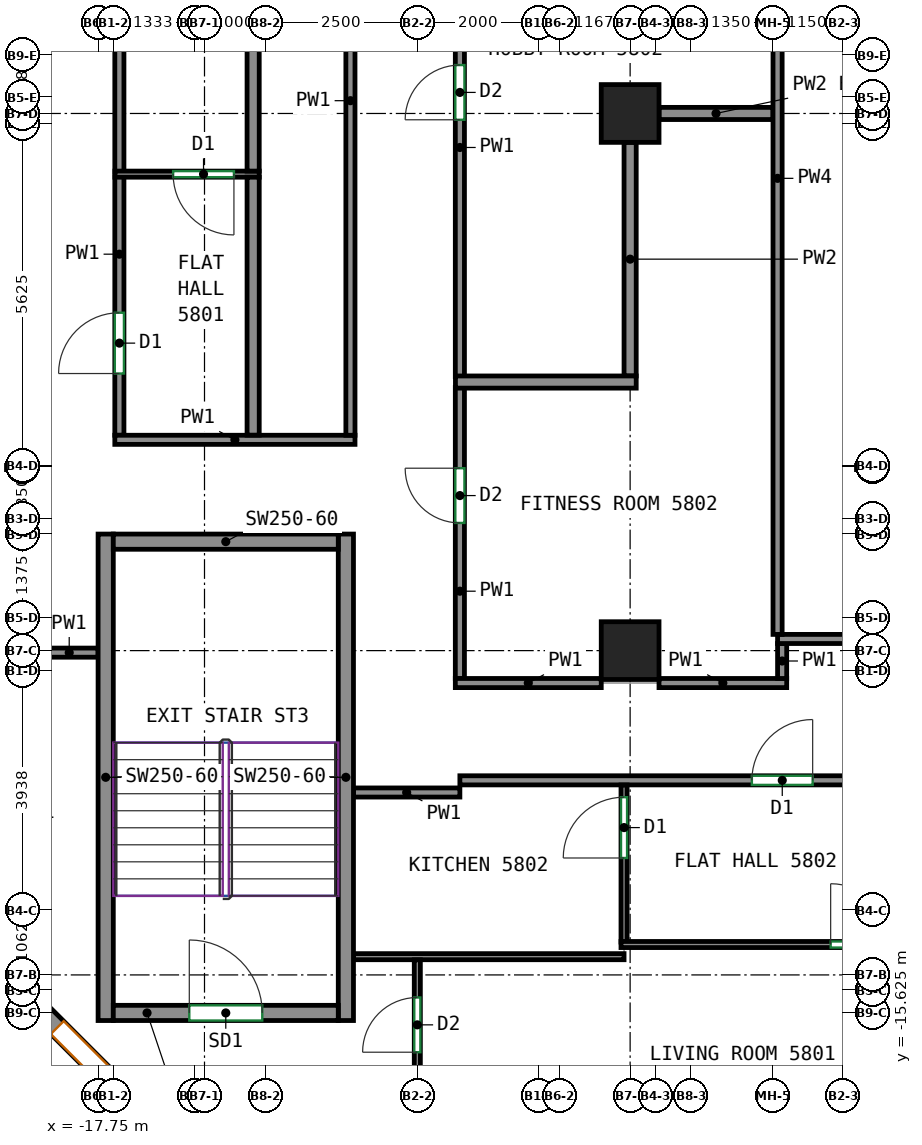
"""IFC4 building model, lengths in metres.
Left out: names, types, materials, properties, quantities, classifications, styles, units other than length and angle.
Written with IfcOpenShell. Run it as: python <this file> out.ifc"""

import sys

from ifc_helpers import new_model, si_unit, direction, frame, frame_2d, origin, origin_2d, place, context, subcontext, project, spatial, rectangle, extrude, source, transform, mapped, element, fill, save


model = new_model("IFC4")
c1 = context("Model", 3, precision=1e-05, world=origin(), true_north=direction((0.0, 1.0)))
c2 = subcontext(c1, "Body", "Model", "MODEL_VIEW")
j1 = project(units=[si_unit("LENGTHUNIT", "METRE"), si_unit("PLANEANGLEUNIT", "RADIAN")], contexts=[c1])
p1 = place(None, origin())
s1 = spatial("IfcSite", under=j1, at=p1, CompositionType="ELEMENT")
p2 = place(p1, origin())
s2 = spatial("IfcBuilding", under=s1, at=p2, CompositionType="ELEMENT")
p3 = place(p2, frame((0.0, 0.0, 242.4)))
s3 = spatial("IfcBuildingStorey", under=s2, at=p3, CompositionType="ELEMENT", Elevation=242.4)
m1 = source(origin(), c2, "Body", "SweptSolid", [
    extrude(rectangle(XDim=0.95, YDim=0.95, at=origin_2d()), origin(), (0.0, 0.0, 1.0), 3.12),
])
for number, where, z_axis, x_axis in (
    (1, (-9.0, -9.667, 0.0), (0.0, 0.0, 1.0), (1.0, 0.0, 0.0)),
    (2, (-9.0, -0.833, 0.0), (0.0, 0.0, 1.0), (1.0, 0.0, 0.0)),
):
    element("IfcColumn", number, at=place(p3, frame(where, z_axis=z_axis, x_axis=x_axis)), inside=s3, PredefinedType="COLUMN", context=c2, shape_type="MappedRepresentation", body=[
        mapped(m1, transform((0.0, 0.0, 0.0))),
    ])
m2 = source(origin(), c2, "Body", "SweptSolid", [
    extrude(rectangle(XDim=8.0, YDim=0.25, at=frame_2d((4.0, 0.0))), origin(), (0.0, 0.0, 1.0), 3.12),
])
for number, where, z_axis, x_axis in (
    (3, (-17.625, -15.75, 0.0), (0.0, 0.0, 1.0), (0.0, 1.0, 0.0)),
    (4, (-13.675, -15.75, 0.0), (0.0, 0.0, 1.0), (0.0, 1.0, 0.0)),
):
    element("IfcWall", number, at=place(p3, frame(where, z_axis=z_axis, x_axis=x_axis)), inside=s3, PredefinedType="SHEAR", context=c2, shape_type="MappedRepresentation", body=[
        mapped(m2, transform((0.0, 0.0, 0.0))),
    ])
m3 = source(origin(), c2, "Body", "SweptSolid", [
    extrude(rectangle(XDim=3.7, YDim=0.25, at=frame_2d((1.85, 0.0))), origin(), (0.0, 0.0, 1.0), 3.12),
])
p4 = place(p3, frame((-17.5, -15.625, 0.0), z_axis=(0.0, 0.0, 1.0), x_axis=(1.0, 0.0, 0.0)))
e5 = element("IfcWall", 5, at=p4, inside=s3, PredefinedType="SHEAR", context=c2, shape_type="MappedRepresentation", body=[
    mapped(m3, transform((0.0, 0.0, 0.0))),
])
p5 = place(p4, frame((1.25, 0.0, 0.0)))
e6 = element("IfcOpeningElement", 6, at=p5, cuts=e5, PredefinedType="OPENING", context=c2, shape_type="SweptSolid", body=[
    extrude(rectangle(XDim=1.2, YDim=2.1, at=frame_2d((0.6, 1.05))), frame((0.0, 0.135, 0.0), z_axis=(0.0, -1.0, 0.0), x_axis=(1.0, 0.0, 0.0)), (0.0, 0.0, 1.0), 0.27),
])
p6 = place(p3, frame((-17.5, -7.875, 0.0), z_axis=(0.0, 0.0, 1.0), x_axis=(1.0, 0.0, 0.0)))
e7 = element("IfcWall", 7, at=p6, inside=s3, PredefinedType="SHEAR", context=c2, shape_type="MappedRepresentation", body=[
    mapped(m3, transform((0.0, 0.0, 0.0))),
])
m4 = source(origin(), c2, "Body", "SweptSolid", [
    extrude(rectangle(XDim=3.323, YDim=0.3, at=frame_2d((1.662, 0.0))), origin(), (0.0, 0.0, 1.0), 3.12),
])
p7 = place(p3, frame((-18.819, -15.469, 0.0), z_axis=(0.0, 0.0, 1.0), x_axis=(0.707070049321, -0.707143511144, 0.0)))
e8 = element("IfcWall", 8, at=p7, inside=s3, PredefinedType="SOLIDWALL", context=c2, shape_type="MappedRepresentation", body=[
    mapped(m4, transform((0.0, 0.0, 0.0))),
])
p8 = place(p7, frame((0.562, 0.0, 0.8)))
e9 = element("IfcOpeningElement", 9, at=p8, cuts=e8, PredefinedType="OPENING", context=c2, shape_type="SweptSolid", body=[
    extrude(rectangle(XDim=2.2, YDim=2.05, at=frame_2d((1.1, 1.025))), frame((0.0, 0.16, 0.0), z_axis=(0.0, -1.0, 0.0), x_axis=(1.0, 0.0, 0.0)), (0.0, 0.0, 1.0), 0.32),
])
p9 = place(p3, frame((-17.4, -6.125, 0.0), z_axis=(0.0, 0.0, 1.0), x_axis=(0.0, 1.0, 0.0)))
e10 = element("IfcWall", 10, at=p9, inside=s3, PredefinedType="PARTITIONING", context=c2, shape_type="SweptSolid", body=[
    extrude(rectangle(XDim=4.254, YDim=0.15, at=frame_2d((2.127, 0.0))), origin(), (0.0, 0.0, 1.0), 3.12),
])
p10 = place(p9, frame((1.015, 0.0, 0.0)))
e11 = element("IfcOpeningElement", 11, at=p10, cuts=e10, PredefinedType="OPENING", context=c2, shape_type="SweptSolid", body=[
    extrude(rectangle(XDim=1.0, YDim=2.1, at=frame_2d((0.5, 1.05))), frame((0.0, 0.085, 0.0), z_axis=(0.0, -1.0, 0.0), x_axis=(1.0, 0.0, 0.0)), (0.0, 0.0, 1.0), 0.17),
])
p11 = place(p3, frame((-17.475, -6.2, 0.0), z_axis=(0.0, 0.0, 1.0), x_axis=(1.0, 0.0, 0.0)))
e12 = element("IfcWall", 12, at=p11, inside=s3, PredefinedType="PARTITIONING", context=c2, shape_type="SweptSolid", body=[
    extrude(rectangle(XDim=3.95, YDim=0.15, at=frame_2d((1.975, 0.0))), origin(), (0.0, 0.0, 1.0), 3.12),
])
p12 = place(p3, frame((-17.4, -1.791, 0.0), z_axis=(0.0, 0.0, 1.0), x_axis=(0.0, 1.0, 0.0)))
e13 = element("IfcWall", 13, at=p12, inside=s3, PredefinedType="PARTITIONING", context=c2, shape_type="SweptSolid", body=[
    extrude(rectangle(XDim=5.925, YDim=0.15, at=frame_2d((2.962, 0.0))), origin(), (0.0, 0.0, 1.0), 3.12),
])
p13 = place(p3, frame((-11.8, -11.8, 0.0), z_axis=(0.0, 0.0, 1.0), x_axis=(1.0, 0.0, 0.0)))
e14 = element("IfcWall", 14, at=p13, inside=s3, PredefinedType="PARTITIONING", context=c2, shape_type="SweptSolid", body=[
    extrude(rectangle(XDim=29.55, YDim=0.15, at=frame_2d((14.775, 0.0))), origin(), (0.0, 0.0, 1.0), 3.12),
])
p14 = place(p13, frame((4.802, 0.0, 0.0)))
e15 = element("IfcOpeningElement", 15, at=p14, cuts=e14, PredefinedType="OPENING", context=c2, shape_type="SweptSolid", body=[
    extrude(rectangle(XDim=1.0, YDim=2.1, at=frame_2d((0.5, 1.05))), frame((0.0, 0.085, 0.0), z_axis=(0.0, -1.0, 0.0), x_axis=(1.0, 0.0, 0.0)), (0.0, 0.0, 1.0), 0.17),
])
p15 = place(p13, frame((23.314, 0.0, 0.0)))
e16 = element("IfcOpeningElement", 16, at=p15, cuts=e14, PredefinedType="OPENING", context=c2, shape_type="SweptSolid", body=[
    extrude(rectangle(XDim=1.0, YDim=2.1, at=frame_2d((0.5, 1.05))), frame((0.0, 0.085, 0.0), z_axis=(0.0, -1.0, 0.0), x_axis=(1.0, 0.0, 0.0)), (0.0, 0.0, 1.0), 0.17),
])
p16 = place(p3, frame((-13.55, -12.0, 0.0), z_axis=(0.0, 0.0, 1.0), x_axis=(1.0, 0.0, 0.0)))
e17 = element("IfcWall", 17, at=p16, inside=s3, PredefinedType="PARTITIONING", context=c2, shape_type="SweptSolid", body=[
    extrude(rectangle(XDim=1.75, YDim=0.15, at=frame_2d((0.875, 0.0))), origin(), (0.0, 0.0, 1.0), 3.12),
])
p17 = place(p3, frame((-18.7, -9.7, 0.0), z_axis=(0.0, 0.0, 1.0), x_axis=(1.0, 0.0, 0.0)))
e18 = element("IfcWall", 18, at=p17, inside=s3, PredefinedType="PARTITIONING", context=c2, shape_type="SweptSolid", body=[
    extrude(rectangle(XDim=0.95, YDim=0.15, at=frame_2d((0.475, 0.0))), origin(), (0.0, 0.0, 1.0), 3.12),
])
p18 = place(p3, frame((-13.6, 4.879, 0.0), z_axis=(0.0, 0.0, 1.0), x_axis=(0.0, -1.0, 0.0)))
e19 = element("IfcWall", 19, at=p18, inside=s3, PredefinedType="PARTITIONING", context=c2, shape_type="SweptSolid", body=[
    extrude(rectangle(XDim=11.004, YDim=0.15, at=frame_2d((5.502, 0.0))), origin(), (0.0, 0.0, 1.0), 3.12),
])
p19 = place(p18, frame((1.601, 0.0, 0.0)))
e20 = element("IfcOpeningElement", 20, at=p19, cuts=e19, PredefinedType="OPENING", context=c2, shape_type="SweptSolid", body=[
    extrude(rectangle(XDim=0.9, YDim=2.1, at=frame_2d((0.45, 1.05))), frame((0.0, 0.085, 0.0), z_axis=(0.0, -1.0, 0.0), x_axis=(1.0, 0.0, 0.0)), (0.0, 0.0, 1.0), 0.17),
])
p20 = place(p3, frame((-11.8, -5.16, 0.0), z_axis=(0.0, 0.0, 1.0), x_axis=(0.0, 1.0, 0.0)))
e21 = element("IfcWall", 21, at=p20, inside=s3, PredefinedType="PARTITIONING", context=c2, shape_type="SweptSolid", body=[
    extrude(rectangle(XDim=7.535, YDim=0.15, at=frame_2d((3.768, 0.0))), origin(), (0.0, 0.0, 1.0), 3.12),
])
p21 = place(p20, frame((4.223, 0.0, 0.0)))
e22 = element("IfcOpeningElement", 22, at=p21, cuts=e21, PredefinedType="OPENING", context=c2, shape_type="SweptSolid", body=[
    extrude(rectangle(XDim=0.9, YDim=2.1, at=frame_2d((0.45, 1.05))), frame((0.0, 0.085, 0.0), z_axis=(0.0, -1.0, 0.0), x_axis=(1.0, 0.0, 0.0)), (0.0, 0.0, 1.0), 0.17),
])
p22 = place(p3, frame((-11.8, -10.125, 0.0), z_axis=(0.0, 0.0, 1.0), x_axis=(0.0, 1.0, 0.0)))
e23 = element("IfcWall", 23, at=p22, inside=s3, PredefinedType="PARTITIONING", context=c2, shape_type="SweptSolid", body=[
    extrude(rectangle(XDim=4.785, YDim=0.15, at=frame_2d((2.393, 0.0))), origin(), (0.0, 0.0, 1.0), 3.12),
])
p23 = place(p22, frame((2.558, 0.0, 0.0)))
e24 = element("IfcOpeningElement", 24, at=p23, cuts=e23, PredefinedType="OPENING", context=c2, shape_type="SweptSolid", body=[
    extrude(rectangle(XDim=0.9, YDim=2.1, at=frame_2d((0.45, 1.05))), frame((0.0, 0.085, 0.0), z_axis=(0.0, -1.0, 0.0), x_axis=(1.0, 0.0, 0.0)), (0.0, 0.0, 1.0), 0.17),
])
p24 = place(p3, frame((-8.525, -10.2, 0.0), z_axis=(0.0, 0.0, 1.0), x_axis=(1.0, 0.0, 0.0)))
e25 = element("IfcWall", 25, at=p24, inside=s3, PredefinedType="PARTITIONING", context=c2, shape_type="SweptSolid", body=[
    extrude(rectangle(XDim=2.1, YDim=0.15, at=frame_2d((1.05, 0.0))), origin(), (0.0, 0.0, 1.0), 3.12),
])
p25 = place(p3, frame((-11.875, -10.2, 0.0), z_axis=(0.0, 0.0, 1.0), x_axis=(1.0, 0.0, 0.0)))
e26 = element("IfcWall", 26, at=p25, inside=s3, PredefinedType="PARTITIONING", context=c2, shape_type="SweptSolid", body=[
    extrude(rectangle(XDim=2.4, YDim=0.15, at=frame_2d((1.2, 0.0))), origin(), (0.0, 0.0, 1.0), 3.12),
])
p26 = place(p3, frame((-6.5, -9.55, 0.0), z_axis=(0.0, 0.0, 1.0), x_axis=(0.0, -1.0, 0.0)))
e27 = element("IfcWall", 27, at=p26, inside=s3, PredefinedType="PARTITIONING", context=c2, shape_type="SweptSolid", body=[
    extrude(rectangle(XDim=0.575, YDim=0.15, at=frame_2d((0.288, 0.0))), origin(), (0.0, 0.0, 1.0), 3.12),
])
p27 = place(p3, frame((-15.1, -1.831, 0.0), z_axis=(0.0, 0.0, 1.0), x_axis=(-1.0, 0.0, 0.0)))
e28 = element("IfcWall", 28, at=p27, inside=s3, PredefinedType="PARTITIONING", context=c2, shape_type="SweptSolid", body=[
    extrude(rectangle(XDim=2.373, YDim=0.1, at=frame_2d((1.187, 0.0))), origin(), (0.0, 0.0, 1.0), 3.12),
])
p28 = place(p27, frame((0.416, 0.0, 0.0)))
e29 = element("IfcOpeningElement", 29, at=p28, cuts=e28, PredefinedType="OPENING", context=c2, shape_type="SweptSolid", body=[
    extrude(rectangle(XDim=1.0, YDim=2.1, at=frame_2d((0.5, 1.05))), frame((0.0, 0.06, 0.0), z_axis=(0.0, -1.0, 0.0), x_axis=(1.0, 0.0, 0.0)), (0.0, 0.0, 1.0), 0.12),
])
p29 = place(p3, frame((-15.2, -6.123, 0.0), z_axis=(0.0, 0.0, 1.0), x_axis=(0.0, 1.0, 0.0)))
e30 = element("IfcWall", 30, at=p29, inside=s3, PredefinedType="PARTITIONING", context=c2, shape_type="SweptSolid", body=[
    extrude(rectangle(XDim=4.242, YDim=0.2, at=frame_2d((2.121, 0.0))), origin(), (0.0, 0.0, 1.0), 3.12),
])
p30 = place(p3, frame((-15.2, -1.781, 0.0), z_axis=(0.0, 0.0, 1.0), x_axis=(0.0, 1.0, 0.0)))
e31 = element("IfcWall", 31, at=p30, inside=s3, PredefinedType="PARTITIONING", context=c2, shape_type="SweptSolid", body=[
    extrude(rectangle(XDim=5.905, YDim=0.2, at=frame_2d((2.953, 0.0))), origin(), (0.0, 0.0, 1.0), 3.12),
])
p31 = place(p3, frame((-9.1, -14.46, 0.0), z_axis=(0.0, 0.0, 1.0), x_axis=(0.0, 1.0, 0.0)))
e32 = element("IfcWall", 32, at=p31, inside=s3, PredefinedType="PARTITIONING", context=c2, shape_type="SweptSolid", body=[
    extrude(rectangle(XDim=2.583, YDim=0.1, at=frame_2d((1.292, 0.0))), origin(), (0.0, 0.0, 1.0), 3.12),
])
p32 = place(p31, frame((1.383, 0.0, 0.0)))
e33 = element("IfcOpeningElement", 33, at=p32, cuts=e32, PredefinedType="OPENING", context=c2, shape_type="SweptSolid", body=[
    extrude(rectangle(XDim=1.0, YDim=2.1, at=frame_2d((0.5, 1.05))), frame((0.0, 0.06, 0.0), z_axis=(0.0, -1.0, 0.0), x_axis=(1.0, 0.0, 0.0)), (0.0, 0.0, 1.0), 0.12),
])
p33 = place(p3, frame((-13.55, -14.7, 0.0), z_axis=(0.0, 0.0, 1.0), x_axis=(1.0, 0.0, 0.0)))
e34 = element("IfcWall", 34, at=p33, inside=s3, PredefinedType="PARTITIONING", context=c2, shape_type="SweptSolid", body=[
    extrude(rectangle(XDim=4.45, YDim=0.1, at=frame_2d((2.225, 0.0))), origin(), (0.0, 0.0, 1.0), 3.12),
])
p34 = place(p3, frame((-9.15, -14.5, 0.0), z_axis=(0.0, 0.0, 1.0), x_axis=(1.0, 0.0, 0.0)))
e35 = element("IfcWall", 35, at=p34, inside=s3, PredefinedType="PARTITIONING", context=c2, shape_type="SweptSolid", body=[
    extrude(rectangle(XDim=14.25, YDim=0.1, at=frame_2d((7.125, 0.0))), origin(), (0.0, 0.0, 1.0), 3.12),
])
p35 = place(p34, frame((3.448, 0.0, 0.0)))
e36 = element("IfcOpeningElement", 36, at=p35, cuts=e35, PredefinedType="OPENING", context=c2, shape_type="SweptSolid", body=[
    extrude(rectangle(XDim=1.0, YDim=2.1, at=frame_2d((0.5, 1.05))), frame((0.0, 0.06, 0.0), z_axis=(0.0, -1.0, 0.0), x_axis=(1.0, 0.0, 0.0)), (0.0, 0.0, 1.0), 0.12),
])
p36 = place(p3, frame((-12.5, -18.25, 0.0), z_axis=(0.0, 0.0, 1.0), x_axis=(0.0, 1.0, 0.0)))
e37 = element("IfcWall", 37, at=p36, inside=s3, PredefinedType="PARTITIONING", context=c2, shape_type="SweptSolid", body=[
    extrude(rectangle(XDim=3.498, YDim=0.1, at=frame_2d((1.749, 0.0))), origin(), (0.0, 0.0, 1.0), 3.12),
])
p37 = place(p36, frame((1.979, 0.0, 0.0)))
e38 = element("IfcOpeningElement", 38, at=p37, cuts=e37, PredefinedType="OPENING", context=c2, shape_type="SweptSolid", body=[
    extrude(rectangle(XDim=0.9, YDim=2.1, at=frame_2d((0.45, 1.05))), frame((0.0, 0.06, 0.0), z_axis=(0.0, -1.0, 0.0), x_axis=(1.0, 0.0, 0.0)), (0.0, 0.0, 1.0), 0.12),
])
p38 = place(p3, frame((-8.525, -0.833, 0.0), z_axis=(0.0, 0.0, 1.0), x_axis=(1.0, 0.0, 0.0)))
e39 = element("IfcWall", 39, at=p38, inside=s3, PredefinedType="PARTITIONING", context=c2, shape_type="SweptSolid", body=[
    extrude(rectangle(XDim=1.875, YDim=0.2, at=frame_2d((0.938, 0.0))), origin(), (0.0, 0.0, 1.0), 2.57),
])
p39 = place(p3, frame((-9.0, -5.15, 0.0), z_axis=(0.0, 0.0, 1.0), x_axis=(0.0, 1.0, 0.0)))
e40 = element("IfcWall", 40, at=p39, inside=s3, PredefinedType="PARTITIONING", context=c2, shape_type="SweptSolid", body=[
    extrude(rectangle(XDim=3.842, YDim=0.2, at=frame_2d((1.921, 0.0))), origin(), (0.0, 0.0, 1.0), 2.57),
])
p40 = place(p3, frame((-11.873, -5.25, 0.0), z_axis=(0.0, 0.0, 1.0), x_axis=(1.0, 0.0, 0.0)))
e41 = element("IfcWall", 41, at=p40, inside=s3, PredefinedType="PARTITIONING", context=c2, shape_type="SweptSolid", body=[
    extrude(rectangle(XDim=2.973, YDim=0.2, at=frame_2d((1.487, 0.0))), origin(), (0.0, 0.0, 1.0), 3.12),
])
p41 = place(p3, frame((8.5, -9.475, 0.0), z_axis=(0.0, 0.0, 1.0), x_axis=(-1.0, 0.0, 0.0)))
e42 = element("IfcWall", 42, at=p41, inside=s3, PredefinedType="PARTITIONING", context=c2, shape_type="SweptSolid", body=[
    extrude(rectangle(XDim=15.075, YDim=0.15, at=frame_2d((7.538, 0.0))), origin(), (0.0, 0.0, 1.0), 2.57),
])
p42 = place(p3, frame((-6.575, -9.4, 0.0), z_axis=(0.0, 0.0, 1.0), x_axis=(0.0, 1.0, 0.0)))
e43 = element("IfcWall", 43, at=p42, inside=s3, PredefinedType="PARTITIONING", context=c2, shape_type="SweptSolid", body=[
    extrude(rectangle(XDim=15.0, YDim=0.15, at=frame_2d((7.5, 0.0))), origin(), (0.0, 0.0, 1.0), 3.12),
])
p43 = place(p8, origin())
e44 = element("IfcWindow", 44, at=p43, inside=s3, PartitioningType="SINGLE_PANEL", PredefinedType="WINDOW", context=c2, shape_type="SweptSolid", body=[
    extrude(rectangle(XDim=2.2, YDim=2.05, at=frame_2d((1.1, 1.025))), frame((0.0, 0.03, 0.0), z_axis=(0.0, -1.0, 0.0), x_axis=(1.0, 0.0, 0.0)), (0.0, 0.0, 1.0), 0.06),
])
fill(e9, e44)
p44 = place(p5, origin())
e45 = element("IfcDoor", 45, at=p44, inside=s3, OperationType="DOUBLE_DOOR_SINGLE_SWING", PredefinedType="DOOR", context=c2, shape_type="SweptSolid", body=[
    extrude(rectangle(XDim=1.2, YDim=2.1, at=frame_2d((0.6, 1.05))), frame((0.0, 0.025, 0.0), z_axis=(0.0, -1.0, 0.0), x_axis=(1.0, 0.0, 0.0)), (0.0, 0.0, 1.0), 0.05),
])
fill(e6, e45)
p45 = place(p37, origin())
e46 = element("IfcDoor", 46, at=p45, inside=s3, OperationType="SINGLE_SWING_LEFT", PredefinedType="DOOR", context=c2, shape_type="SweptSolid", body=[
    extrude(rectangle(XDim=0.9, YDim=2.1, at=frame_2d((0.45, 1.05))), frame((0.0, 0.025, 0.0), z_axis=(0.0, -1.0, 0.0), x_axis=(1.0, 0.0, 0.0)), (0.0, 0.0, 1.0), 0.05),
])
fill(e38, e46)
p46 = place(p35, origin())
e47 = element("IfcDoor", 47, at=p46, inside=s3, OperationType="SINGLE_SWING_LEFT", PredefinedType="DOOR", context=c2, shape_type="SweptSolid", body=[
    extrude(rectangle(XDim=1.0, YDim=2.1, at=frame_2d((0.5, 1.05))), frame((0.0, 0.025, 0.0), z_axis=(0.0, -1.0, 0.0), x_axis=(1.0, 0.0, 0.0)), (0.0, 0.0, 1.0), 0.05),
])
fill(e36, e47)
p47 = place(p32, origin())
e48 = element("IfcDoor", 48, at=p47, inside=s3, OperationType="SINGLE_SWING_LEFT", PredefinedType="DOOR", context=c2, shape_type="SweptSolid", body=[
    extrude(rectangle(XDim=1.0, YDim=2.1, at=frame_2d((0.5, 1.05))), frame((0.0, 0.025, 0.0), z_axis=(0.0, -1.0, 0.0), x_axis=(1.0, 0.0, 0.0)), (0.0, 0.0, 1.0), 0.05),
])
fill(e33, e48)
p48 = place(p14, origin())
e49 = element("IfcDoor", 49, at=p48, inside=s3, OperationType="SINGLE_SWING_RIGHT", PredefinedType="DOOR", context=c2, shape_type="SweptSolid", body=[
    extrude(rectangle(XDim=1.0, YDim=2.1, at=frame_2d((0.5, 1.05))), frame((0.0, 0.025, 0.0), z_axis=(0.0, -1.0, 0.0), x_axis=(1.0, 0.0, 0.0)), (0.0, 0.0, 1.0), 0.05),
])
fill(e15, e49)
p49 = place(p23, origin())
e50 = element("IfcDoor", 50, at=p49, inside=s3, OperationType="SINGLE_SWING_RIGHT", PredefinedType="DOOR", context=c2, shape_type="SweptSolid", body=[
    extrude(rectangle(XDim=0.9, YDim=2.1, at=frame_2d((0.45, 1.05))), frame((0.0, 0.025, 0.0), z_axis=(0.0, -1.0, 0.0), x_axis=(1.0, 0.0, 0.0)), (0.0, 0.0, 1.0), 0.05),
])
fill(e24, e50)
p50 = place(p10, origin())
e51 = element("IfcDoor", 51, at=p50, inside=s3, OperationType="SINGLE_SWING_LEFT", PredefinedType="DOOR", context=c2, shape_type="SweptSolid", body=[
    extrude(rectangle(XDim=1.0, YDim=2.1, at=frame_2d((0.5, 1.05))), frame((0.0, 0.025, 0.0), z_axis=(0.0, -1.0, 0.0), x_axis=(1.0, 0.0, 0.0)), (0.0, 0.0, 1.0), 0.05),
])
fill(e11, e51)
p51 = place(p28, origin())
e52 = element("IfcDoor", 52, at=p51, inside=s3, OperationType="SINGLE_SWING_LEFT", PredefinedType="DOOR", context=c2, shape_type="SweptSolid", body=[
    extrude(rectangle(XDim=1.0, YDim=2.1, at=frame_2d((0.5, 1.05))), frame((0.0, 0.025, 0.0), z_axis=(0.0, -1.0, 0.0), x_axis=(1.0, 0.0, 0.0)), (0.0, 0.0, 1.0), 0.05),
])
fill(e29, e52)
p52 = place(p21, origin())
e53 = element("IfcDoor", 53, at=p52, inside=s3, OperationType="SINGLE_SWING_LEFT", PredefinedType="DOOR", context=c2, shape_type="SweptSolid", body=[
    extrude(rectangle(XDim=0.9, YDim=2.1, at=frame_2d((0.45, 1.05))), frame((0.0, 0.025, 0.0), z_axis=(0.0, -1.0, 0.0), x_axis=(1.0, 0.0, 0.0)), (0.0, 0.0, 1.0), 0.05),
])
fill(e22, e53)
save(model, sys.argv[1])
